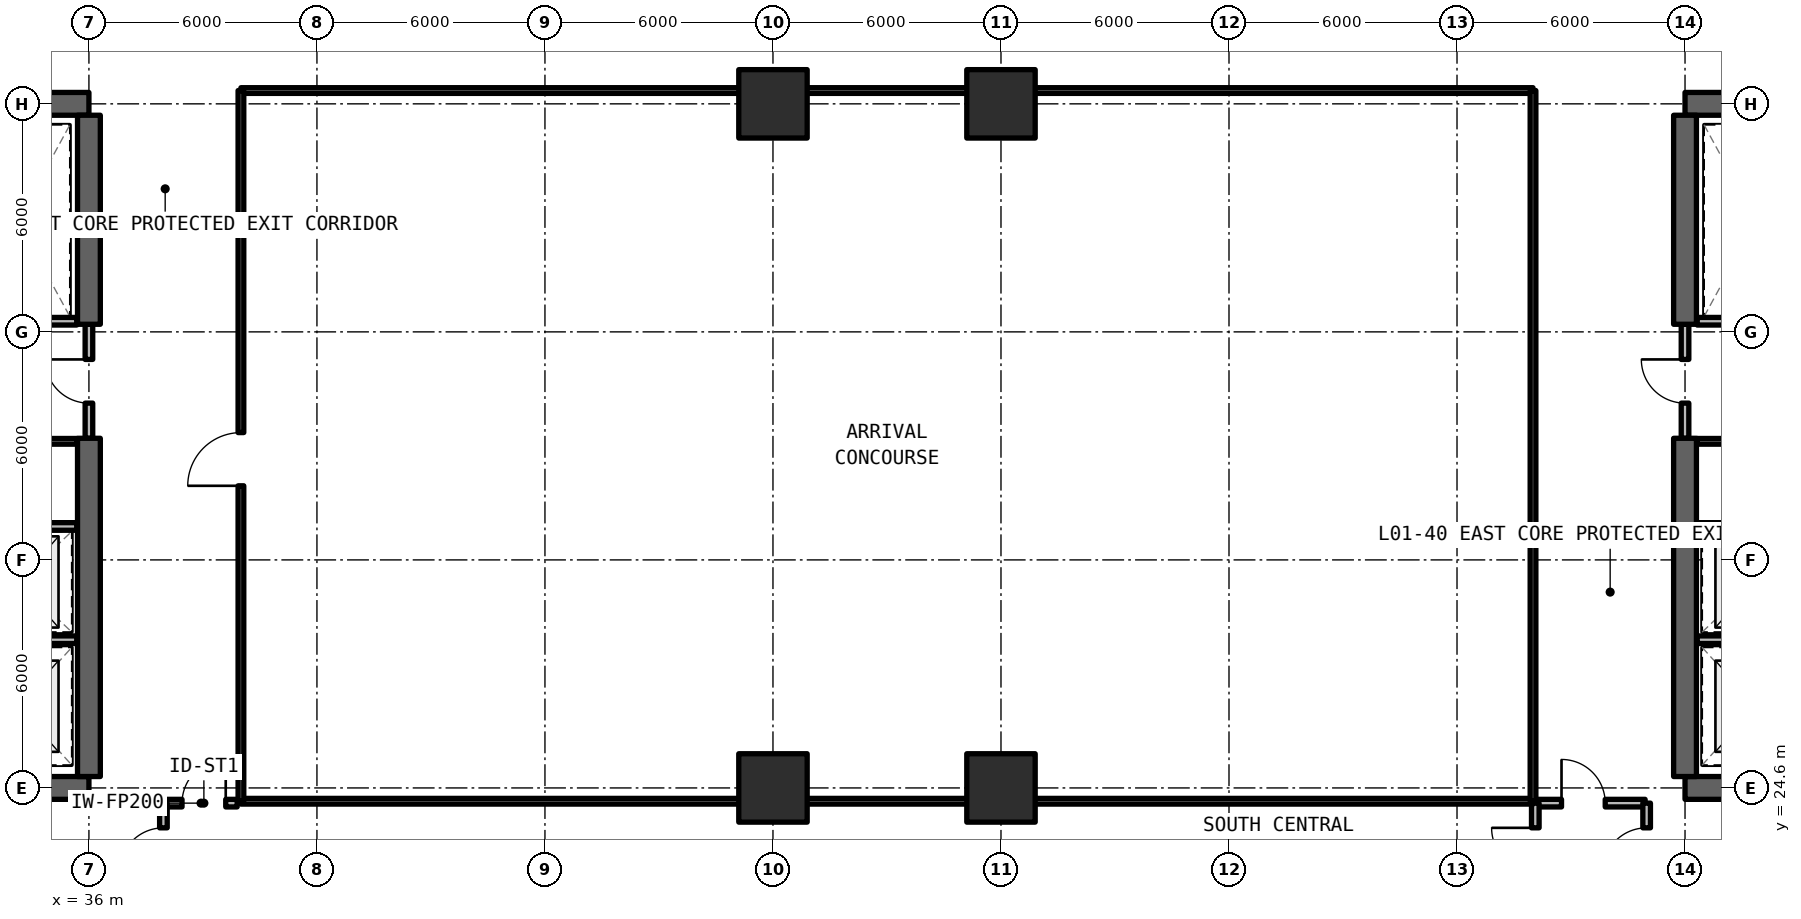
"""IFC4 building model, lengths in metres.
Left out: names, types, materials, properties, quantities, classifications, styles, units other than length and angle.
Written with IfcOpenShell. Run it as: python <this file> out.ifc"""

import sys

from ifc_helpers import new_model, si_unit, direction, frame, frame_2d, origin, origin_2d, place, context, subcontext, project, spatial, rectangle, extrude, element, fill, save


model = new_model("IFC4")
c1 = context("Model", 3, precision=1e-05, world=origin(), true_north=direction((0.0, 1.0)))
c2 = subcontext(c1, "Body", "Model", "MODEL_VIEW")
j1 = project(units=[si_unit("LENGTHUNIT", "METRE"), si_unit("PLANEANGLEUNIT", "RADIAN")], contexts=[c1])
p1 = place(None, origin())
s1 = spatial("IfcSite", under=j1, at=p1, CompositionType="ELEMENT")
p2 = place(p1, origin())
s2 = spatial("IfcBuilding", under=s1, at=p2, CompositionType="ELEMENT")
p3 = place(p2, origin())
s3 = spatial("IfcBuildingStorey", under=s2, at=p3, CompositionType="ELEMENT", Elevation=0.0)
for number, where, z_axis, x_axis in (
    (1, (24.0, 24.6, 0.0), (0.0, 0.0, 1.0), (1.0, 0.0, 0.0)),
    (2, (36.0, 42.6, 0.0), (0.0, 0.0, 1.0), (-1.0, 0.0, 0.0)),
):
    element("IfcWall", number, at=place(p3, frame(where, z_axis=z_axis, x_axis=x_axis)), inside=s3, PredefinedType="SHEAR", context=c2, shape_type="SweptSolid", body=[
        extrude(rectangle(XDim=12.0, YDim=0.6, at=frame_2d((6.0, 0.0))), origin(), (0.0, 0.0, 1.0), 4.95),
    ])
p4 = place(p3, frame((36.0, 24.9, 0.0), z_axis=(0.0, 0.0, 1.0), x_axis=(0.0, 1.0, 0.0)))
e3 = element("IfcWall", 3, at=p4, inside=s3, PredefinedType="SHEAR", context=c2, shape_type="SweptSolid", body=[
    extrude(rectangle(XDim=8.9, YDim=0.6, at=frame_2d((4.45, 0.0))), origin(), (0.0, 0.0, 1.0), 4.95),
])
p5 = place(p3, frame((36.0, 36.8, 0.0), z_axis=(0.0, 0.0, 1.0), x_axis=(0.0, 1.0, 0.0)))
e4 = element("IfcWall", 4, at=p5, inside=s3, PredefinedType="SHEAR", context=c2, shape_type="SweptSolid", body=[
    extrude(rectangle(XDim=5.5, YDim=0.6, at=frame_2d((2.75, 0.0))), origin(), (0.0, 0.0, 1.0), 4.95),
])
for number, where, z_axis, x_axis in (
    (5, (78.0, 24.6, 0.0), (0.0, 0.0, 1.0), (1.0, 0.0, 0.0)),
    (6, (90.0, 42.6, 0.0), (0.0, 0.0, 1.0), (-1.0, 0.0, 0.0)),
):
    element("IfcWall", number, at=place(p3, frame(where, z_axis=z_axis, x_axis=x_axis)), inside=s3, PredefinedType="SHEAR", context=c2, shape_type="SweptSolid", body=[
        extrude(rectangle(XDim=12.0, YDim=0.6, at=frame_2d((6.0, 0.0))), origin(), (0.0, 0.0, 1.0), 4.95),
    ])
p6 = place(p3, frame((78.0, 24.9, 0.0), z_axis=(0.0, 0.0, 1.0), x_axis=(0.0, 1.0, 0.0)))
e7 = element("IfcWall", 7, at=p6, inside=s3, PredefinedType="SHEAR", context=c2, shape_type="SweptSolid", body=[
    extrude(rectangle(XDim=8.9, YDim=0.6, at=frame_2d((4.45, 0.0))), origin(), (0.0, 0.0, 1.0), 4.95),
])
p7 = place(p3, frame((78.0, 36.8, 0.0), z_axis=(0.0, 0.0, 1.0), x_axis=(0.0, 1.0, 0.0)))
e8 = element("IfcWall", 8, at=p7, inside=s3, PredefinedType="SHEAR", context=c2, shape_type="SweptSolid", body=[
    extrude(rectangle(XDim=5.5, YDim=0.6, at=frame_2d((2.75, 0.0))), origin(), (0.0, 0.0, 1.0), 4.95),
])
for number, where, z_axis, x_axis in (
    (9, (54.0, 24.6, 0.0), (0.0, 0.0, 1.0), (1.0, 0.0, 0.0)),
    (10, (54.0, 42.6, 0.0), (0.0, 0.0, 1.0), (1.0, 0.0, 0.0)),
    (11, (60.0, 24.6, 0.0), (0.0, 0.0, 1.0), (1.0, 0.0, 0.0)),
    (12, (60.0, 42.6, 0.0), (0.0, 0.0, 1.0), (1.0, 0.0, 0.0)),
):
    element("IfcColumn", number, at=place(p3, frame(where, z_axis=z_axis, x_axis=x_axis)), inside=s3, PredefinedType="COLUMN", context=c2, shape_type="SweptSolid", body=[
        extrude(rectangle(XDim=1.8, YDim=1.8, at=origin_2d()), origin(), (0.0, 0.0, 1.0), 4.95),
    ])
p8 = place(p3, frame((28.32, 28.5, 0.0), z_axis=(0.0, 0.0, 1.0), x_axis=(1.0, 0.0, 0.0)))
e13 = element("IfcWall", 13, at=p8, inside=s3, PredefinedType="SOLIDWALL", context=c2, shape_type="SweptSolid", body=[
    extrude(rectangle(XDim=7.36, YDim=0.2, at=frame_2d((3.68, 0.0))), origin(), (0.0, 0.0, 1.0), 3.89),
])
p9 = place(p8, frame((2.88, 0.0, 0.0)))
e14 = element("IfcOpeningElement", 14, at=p9, cuts=e13, PredefinedType="OPENING", context=c2, shape_type="SweptSolid", body=[
    extrude(rectangle(XDim=1.0, YDim=2.15, at=frame_2d((0.5, 1.075))), frame((0.0, 0.11, 0.0), z_axis=(0.0, -1.0, 0.0), x_axis=(1.0, 0.0, 0.0)), (0.0, 0.0, 1.0), 0.22),
])
p10 = place(p3, frame((36.0, 33.8, 0.0), z_axis=(0.0, 0.0, 1.0), x_axis=(0.0, 1.0, 0.0)))
e15 = element("IfcWall", 15, at=p10, inside=s3, PredefinedType="SOLIDWALL", context=c2, shape_type="SweptSolid", body=[
    extrude(rectangle(XDim=3.0, YDim=0.2, at=frame_2d((1.5, 0.0))), origin(), (0.0, 0.0, 1.0), 3.89),
])
p11 = place(p10, frame((0.925, 0.0, 0.0)))
e16 = element("IfcOpeningElement", 16, at=p11, cuts=e15, PredefinedType="OPENING", context=c2, shape_type="SweptSolid", body=[
    extrude(rectangle(XDim=1.15, YDim=2.15, at=frame_2d((0.575, 1.075))), frame((0.0, 0.11, 0.0), z_axis=(0.0, -1.0, 0.0), x_axis=(1.0, 0.0, 0.0)), (0.0, 0.0, 1.0), 0.22),
])
p12 = place(p3, frame((32.68, 31.48, 0.0), z_axis=(0.0, 0.0, 1.0), x_axis=(1.0, 0.0, 0.0)))
e17 = element("IfcWall", 17, at=p12, inside=s3, PredefinedType="SOLIDWALL", context=c2, shape_type="SweptSolid", body=[
    extrude(rectangle(XDim=3.0, YDim=0.2, at=frame_2d((1.5, 0.0))), origin(), (0.0, 0.0, 1.0), 3.89),
])
p13 = place(p3, frame((32.68, 33.72, 0.0), z_axis=(0.0, 0.0, 1.0), x_axis=(1.0, 0.0, 0.0)))
e18 = element("IfcWall", 18, at=p13, inside=s3, PredefinedType="SOLIDWALL", context=c2, shape_type="SweptSolid", body=[
    extrude(rectangle(XDim=3.0, YDim=0.15, at=frame_2d((1.5, 0.0))), origin(), (0.0, 0.0, 1.0), 3.89),
])
p14 = place(p13, frame((0.95, 0.0, 0.0)))
e19 = element("IfcOpeningElement", 19, at=p14, cuts=e18, PredefinedType="OPENING", context=c2, shape_type="SweptSolid", body=[
    extrude(rectangle(XDim=0.95, YDim=2.15, at=frame_2d((0.475, 1.075))), frame((0.0, 0.085, 0.0), z_axis=(0.0, -1.0, 0.0), x_axis=(1.0, 0.0, 0.0)), (0.0, 0.0, 1.0), 0.17),
])
p15 = place(p3, frame((32.68, 36.88, 0.0), z_axis=(0.0, 0.0, 1.0), x_axis=(1.0, 0.0, 0.0)))
e20 = element("IfcWall", 20, at=p15, inside=s3, PredefinedType="SOLIDWALL", context=c2, shape_type="SweptSolid", body=[
    extrude(rectangle(XDim=3.0, YDim=0.2, at=frame_2d((1.5, 0.0))), origin(), (0.0, 0.0, 1.0), 3.89),
])
p16 = place(p3, frame((78.32, 28.5, 0.0), z_axis=(0.0, 0.0, 1.0), x_axis=(1.0, 0.0, 0.0)))
e21 = element("IfcWall", 21, at=p16, inside=s3, PredefinedType="SOLIDWALL", context=c2, shape_type="SweptSolid", body=[
    extrude(rectangle(XDim=7.36, YDim=0.2, at=frame_2d((3.68, 0.0))), origin(), (0.0, 0.0, 1.0), 3.89),
])
p17 = place(p16, frame((3.48, 0.0, 0.0)))
e22 = element("IfcOpeningElement", 22, at=p17, cuts=e21, PredefinedType="OPENING", context=c2, shape_type="SweptSolid", body=[
    extrude(rectangle(XDim=1.0, YDim=2.15, at=frame_2d((0.5, 1.075))), frame((0.0, 0.11, 0.0), z_axis=(0.0, -1.0, 0.0), x_axis=(1.0, 0.0, 0.0)), (0.0, 0.0, 1.0), 0.22),
])
p18 = place(p3, frame((78.0, 33.8, 0.0), z_axis=(0.0, 0.0, 1.0), x_axis=(0.0, 1.0, 0.0)))
e23 = element("IfcWall", 23, at=p18, inside=s3, PredefinedType="SOLIDWALL", context=c2, shape_type="SweptSolid", body=[
    extrude(rectangle(XDim=3.0, YDim=0.2, at=frame_2d((1.5, 0.0))), origin(), (0.0, 0.0, 1.0), 3.89),
])
p19 = place(p18, frame((0.925, 0.0, 0.0)))
e24 = element("IfcOpeningElement", 24, at=p19, cuts=e23, PredefinedType="OPENING", context=c2, shape_type="SweptSolid", body=[
    extrude(rectangle(XDim=1.15, YDim=2.15, at=frame_2d((0.575, 1.075))), frame((0.0, 0.11, 0.0), z_axis=(0.0, -1.0, 0.0), x_axis=(1.0, 0.0, 0.0)), (0.0, 0.0, 1.0), 0.22),
])
p20 = place(p3, frame((78.32, 31.48, 0.0), z_axis=(0.0, 0.0, 1.0), x_axis=(1.0, 0.0, 0.0)))
e25 = element("IfcWall", 25, at=p20, inside=s3, PredefinedType="SOLIDWALL", context=c2, shape_type="SweptSolid", body=[
    extrude(rectangle(XDim=3.0, YDim=0.2, at=frame_2d((1.5, 0.0))), origin(), (0.0, 0.0, 1.0), 3.89),
])
p21 = place(p3, frame((78.32, 33.72, 0.0), z_axis=(0.0, 0.0, 1.0), x_axis=(1.0, 0.0, 0.0)))
e26 = element("IfcWall", 26, at=p21, inside=s3, PredefinedType="SOLIDWALL", context=c2, shape_type="SweptSolid", body=[
    extrude(rectangle(XDim=3.0, YDim=0.15, at=frame_2d((1.5, 0.0))), origin(), (0.0, 0.0, 1.0), 3.89),
])
p22 = place(p21, frame((0.95, 0.0, 0.0)))
e27 = element("IfcOpeningElement", 27, at=p22, cuts=e26, PredefinedType="OPENING", context=c2, shape_type="SweptSolid", body=[
    extrude(rectangle(XDim=0.95, YDim=2.15, at=frame_2d((0.475, 1.075))), frame((0.0, 0.085, 0.0), z_axis=(0.0, -1.0, 0.0), x_axis=(1.0, 0.0, 0.0)), (0.0, 0.0, 1.0), 0.17),
])
p23 = place(p3, frame((78.32, 36.88, 0.0), z_axis=(0.0, 0.0, 1.0), x_axis=(1.0, 0.0, 0.0)))
e28 = element("IfcWall", 28, at=p23, inside=s3, PredefinedType="SOLIDWALL", context=c2, shape_type="SweptSolid", body=[
    extrude(rectangle(XDim=3.0, YDim=0.2, at=frame_2d((1.5, 0.0))), origin(), (0.0, 0.0, 1.0), 3.89),
])
p24 = place(p3, frame((38.0, 24.2, 0.0), z_axis=(0.0, 0.0, 1.0), x_axis=(1.0, 0.0, 0.0)))
e29 = element("IfcWall", 29, at=p24, inside=s3, PredefinedType="SOLIDWALL", context=c2, shape_type="SweptSolid", body=[
    extrude(rectangle(XDim=1.9, YDim=0.2, at=frame_2d((0.95, 0.0))), origin(), (0.0, 0.0, 1.0), 3.89),
])
p25 = place(p24, frame((0.45, 0.0, 0.0)))
e30 = element("IfcOpeningElement", 30, at=p25, cuts=e29, PredefinedType="OPENING", context=c2, shape_type="SweptSolid", body=[
    extrude(rectangle(XDim=1.15, YDim=2.15, at=frame_2d((0.575, 1.075))), frame((0.0, 0.11, 0.0), z_axis=(0.0, -1.0, 0.0), x_axis=(1.0, 0.0, 0.0)), (0.0, 0.0, 1.0), 0.22),
])
p26 = place(p3, frame((74.1, 24.2, 0.0), z_axis=(0.0, 0.0, 1.0), x_axis=(1.0, 0.0, 0.0)))
e31 = element("IfcWall", 31, at=p26, inside=s3, PredefinedType="SOLIDWALL", context=c2, shape_type="SweptSolid", body=[
    extrude(rectangle(XDim=2.85, YDim=0.2, at=frame_2d((1.425, 0.0))), origin(), (0.0, 0.0, 1.0), 3.89),
])
p27 = place(p26, frame((0.65, 0.0, 0.0)))
e32 = element("IfcOpeningElement", 32, at=p27, cuts=e31, PredefinedType="OPENING", context=c2, shape_type="SweptSolid", body=[
    extrude(rectangle(XDim=1.15, YDim=2.15, at=frame_2d((0.575, 1.075))), frame((0.0, 0.11, 0.0), z_axis=(0.0, -1.0, 0.0), x_axis=(1.0, 0.0, 0.0)), (0.0, 0.0, 1.0), 0.22),
])
p28 = place(p3, frame((37.96, 0.3, 0.0), z_axis=(0.0, 0.0, 1.0), x_axis=(0.0, 1.0, 0.0)))
e33 = element("IfcWall", 33, at=p28, inside=s3, PredefinedType="SOLIDWALL", context=c2, shape_type="SweptSolid", body=[
    extrude(rectangle(XDim=23.9, YDim=0.2, at=frame_2d((11.95, 0.0))), origin(), (0.0, 0.0, 1.0), 3.89),
])
p29 = place(p28, frame((22.1, 0.0, 0.0)))
e34 = element("IfcOpeningElement", 34, at=p29, cuts=e33, PredefinedType="OPENING", context=c2, shape_type="SweptSolid", body=[
    extrude(rectangle(XDim=1.15, YDim=2.15, at=frame_2d((0.575, 1.075))), frame((0.0, 0.11, 0.0), z_axis=(0.0, -1.0, 0.0), x_axis=(1.0, 0.0, 0.0)), (0.0, 0.0, 1.0), 0.22),
])
p30 = place(p3, frame((74.06, 0.3, 0.0), z_axis=(0.0, 0.0, 1.0), x_axis=(0.0, 1.0, 0.0)))
e35 = element("IfcWall", 35, at=p30, inside=s3, PredefinedType="SOLIDWALL", context=c2, shape_type="SweptSolid", body=[
    extrude(rectangle(XDim=23.9, YDim=0.2, at=frame_2d((11.95, 0.0))), origin(), (0.0, 0.0, 1.0), 3.89),
])
p31 = place(p30, frame((22.1, 0.0, 0.0)))
e36 = element("IfcOpeningElement", 36, at=p31, cuts=e35, PredefinedType="OPENING", context=c2, shape_type="SweptSolid", body=[
    extrude(rectangle(XDim=1.15, YDim=2.15, at=frame_2d((0.575, 1.075))), frame((0.0, 0.11, 0.0), z_axis=(0.0, -1.0, 0.0), x_axis=(1.0, 0.0, 0.0)), (0.0, 0.0, 1.0), 0.22),
])
p32 = place(p3, frame((76.99, 0.3, 0.0), z_axis=(0.0, 0.0, 1.0), x_axis=(0.0, 1.0, 0.0)))
e37 = element("IfcWall", 37, at=p32, inside=s3, PredefinedType="SOLIDWALL", context=c2, shape_type="SweptSolid", body=[
    extrude(rectangle(XDim=23.9, YDim=0.2, at=frame_2d((11.95, 0.0))), origin(), (0.0, 0.0, 1.0), 3.89),
])
p33 = place(p32, frame((22.1, 0.0, 0.0)))
e38 = element("IfcOpeningElement", 38, at=p33, cuts=e37, PredefinedType="OPENING", context=c2, shape_type="SweptSolid", body=[
    extrude(rectangle(XDim=1.15, YDim=2.15, at=frame_2d((0.575, 1.075))), frame((0.0, 0.11, 0.0), z_axis=(0.0, -1.0, 0.0), x_axis=(1.0, 0.0, 0.0)), (0.0, 0.0, 1.0), 0.22),
])
for number, where, z_axis, x_axis in (
    (39, (40.0, 24.25, 0.0), (0.0, 0.0, 1.0), (1.0, 0.0, 0.0)),
    (40, (40.0, 42.95, 0.0), (0.0, 0.0, 1.0), (1.0, 0.0, 0.0)),
):
    element("IfcWall", number, at=place(p3, frame(where, z_axis=z_axis, x_axis=x_axis)), inside=s3, PredefinedType="SOLIDWALL", context=c2, shape_type="SweptSolid", body=[
        extrude(rectangle(XDim=34.0, YDim=0.15, at=frame_2d((17.0, 0.0))), origin(), (0.0, 0.0, 1.0), 3.89),
    ])
p34 = place(p3, frame((40.0, 24.25, 0.0), z_axis=(0.0, 0.0, 1.0), x_axis=(0.0, 1.0, 0.0)))
e41 = element("IfcWall", 41, at=p34, inside=s3, PredefinedType="SOLIDWALL", context=c2, shape_type="SweptSolid", body=[
    extrude(rectangle(XDim=18.7, YDim=0.15, at=frame_2d((9.35, 0.0))), origin(), (0.0, 0.0, 1.0), 3.89),
])
p35 = place(p34, frame((8.3, 0.0, 0.0)))
e42 = element("IfcOpeningElement", 42, at=p35, cuts=e41, PredefinedType="OPENING", context=c2, shape_type="SweptSolid", body=[
    extrude(rectangle(XDim=1.4, YDim=2.15, at=frame_2d((0.7, 1.075))), frame((0.0, 0.085, 0.0), z_axis=(0.0, -1.0, 0.0), x_axis=(1.0, 0.0, 0.0)), (0.0, 0.0, 1.0), 0.17),
])
p36 = place(p3, frame((74.0, 24.25, 0.0), z_axis=(0.0, 0.0, 1.0), x_axis=(0.0, 1.0, 0.0)))
e43 = element("IfcWall", 43, at=p36, inside=s3, PredefinedType="SOLIDWALL", context=c2, shape_type="SweptSolid", body=[
    extrude(rectangle(XDim=18.7, YDim=0.15, at=frame_2d((9.35, 0.0))), origin(), (0.0, 0.0, 1.0), 3.89),
])
p37 = place(p11, frame((1.15, 0.0, 0.0), z_axis=(0.0, 0.0, 1.0), x_axis=(-1.0, 0.0, 0.0)))
e44 = element("IfcDoor", 44, at=p37, inside=s3, OperationType="SINGLE_SWING_RIGHT", PredefinedType="DOOR", context=c2, shape_type="SweptSolid", body=[
    extrude(rectangle(XDim=1.15, YDim=2.15, at=frame_2d((0.575, 1.075))), frame((0.0, 0.025, 0.0), z_axis=(0.0, -1.0, 0.0), x_axis=(1.0, 0.0, 0.0)), (0.0, 0.0, 1.0), 0.05),
])
fill(e16, e44)
p38 = place(p19, origin())
e45 = element("IfcDoor", 45, at=p38, inside=s3, OperationType="SINGLE_SWING_RIGHT", PredefinedType="DOOR", context=c2, shape_type="SweptSolid", body=[
    extrude(rectangle(XDim=1.15, YDim=2.15, at=frame_2d((0.575, 1.075))), frame((0.0, 0.025, 0.0), z_axis=(0.0, -1.0, 0.0), x_axis=(1.0, 0.0, 0.0)), (0.0, 0.0, 1.0), 0.05),
])
fill(e24, e45)
p39 = place(p25, frame((1.15, 0.0, 0.0), z_axis=(0.0, 0.0, 1.0), x_axis=(-1.0, 0.0, 0.0)))
e46 = element("IfcDoor", 46, at=p39, inside=s3, OperationType="SINGLE_SWING_RIGHT", PredefinedType="DOOR", context=c2, shape_type="SweptSolid", body=[
    extrude(rectangle(XDim=1.15, YDim=2.15, at=frame_2d((0.575, 1.075))), frame((0.0, 0.025, 0.0), z_axis=(0.0, -1.0, 0.0), x_axis=(1.0, 0.0, 0.0)), (0.0, 0.0, 1.0), 0.05),
])
fill(e30, e46)
p40 = place(p27, frame((1.15, 0.0, 0.0), z_axis=(0.0, 0.0, 1.0), x_axis=(-1.0, 0.0, 0.0)))
e47 = element("IfcDoor", 47, at=p40, inside=s3, OperationType="SINGLE_SWING_LEFT", PredefinedType="DOOR", context=c2, shape_type="SweptSolid", body=[
    extrude(rectangle(XDim=1.15, YDim=2.15, at=frame_2d((0.575, 1.075))), frame((0.0, 0.025, 0.0), z_axis=(0.0, -1.0, 0.0), x_axis=(1.0, 0.0, 0.0)), (0.0, 0.0, 1.0), 0.05),
])
fill(e32, e47)
p41 = place(p29, frame((1.15, 0.0, 0.0), z_axis=(0.0, 0.0, 1.0), x_axis=(-1.0, 0.0, 0.0)))
e48 = element("IfcDoor", 48, at=p41, inside=s3, OperationType="SINGLE_SWING_LEFT", PredefinedType="DOOR", context=c2, shape_type="SweptSolid", body=[
    extrude(rectangle(XDim=1.15, YDim=2.15, at=frame_2d((0.575, 1.075))), frame((0.0, 0.025, 0.0), z_axis=(0.0, -1.0, 0.0), x_axis=(1.0, 0.0, 0.0)), (0.0, 0.0, 1.0), 0.05),
])
fill(e34, e48)
p42 = place(p31, frame((1.15, 0.0, 0.0), z_axis=(0.0, 0.0, 1.0), x_axis=(-1.0, 0.0, 0.0)))
e49 = element("IfcDoor", 49, at=p42, inside=s3, OperationType="SINGLE_SWING_RIGHT", PredefinedType="DOOR", context=c2, shape_type="SweptSolid", body=[
    extrude(rectangle(XDim=1.15, YDim=2.15, at=frame_2d((0.575, 1.075))), frame((0.0, 0.025, 0.0), z_axis=(0.0, -1.0, 0.0), x_axis=(1.0, 0.0, 0.0)), (0.0, 0.0, 1.0), 0.05),
])
fill(e36, e49)
p43 = place(p33, origin())
e50 = element("IfcDoor", 50, at=p43, inside=s3, OperationType="SINGLE_SWING_LEFT", PredefinedType="DOOR", context=c2, shape_type="SweptSolid", body=[
    extrude(rectangle(XDim=1.15, YDim=2.15, at=frame_2d((0.575, 1.075))), frame((0.0, 0.025, 0.0), z_axis=(0.0, -1.0, 0.0), x_axis=(1.0, 0.0, 0.0)), (0.0, 0.0, 1.0), 0.05),
])
fill(e38, e50)
p44 = place(p35, origin())
e51 = element("IfcDoor", 51, at=p44, inside=s3, OperationType="SINGLE_SWING_LEFT", PredefinedType="DOOR", context=c2, shape_type="SweptSolid", body=[
    extrude(rectangle(XDim=1.4, YDim=2.15, at=frame_2d((0.7, 1.075))), frame((0.0, 0.025, 0.0), z_axis=(0.0, -1.0, 0.0), x_axis=(1.0, 0.0, 0.0)), (0.0, 0.0, 1.0), 0.05),
])
fill(e42, e51)
save(model, sys.argv[1])
